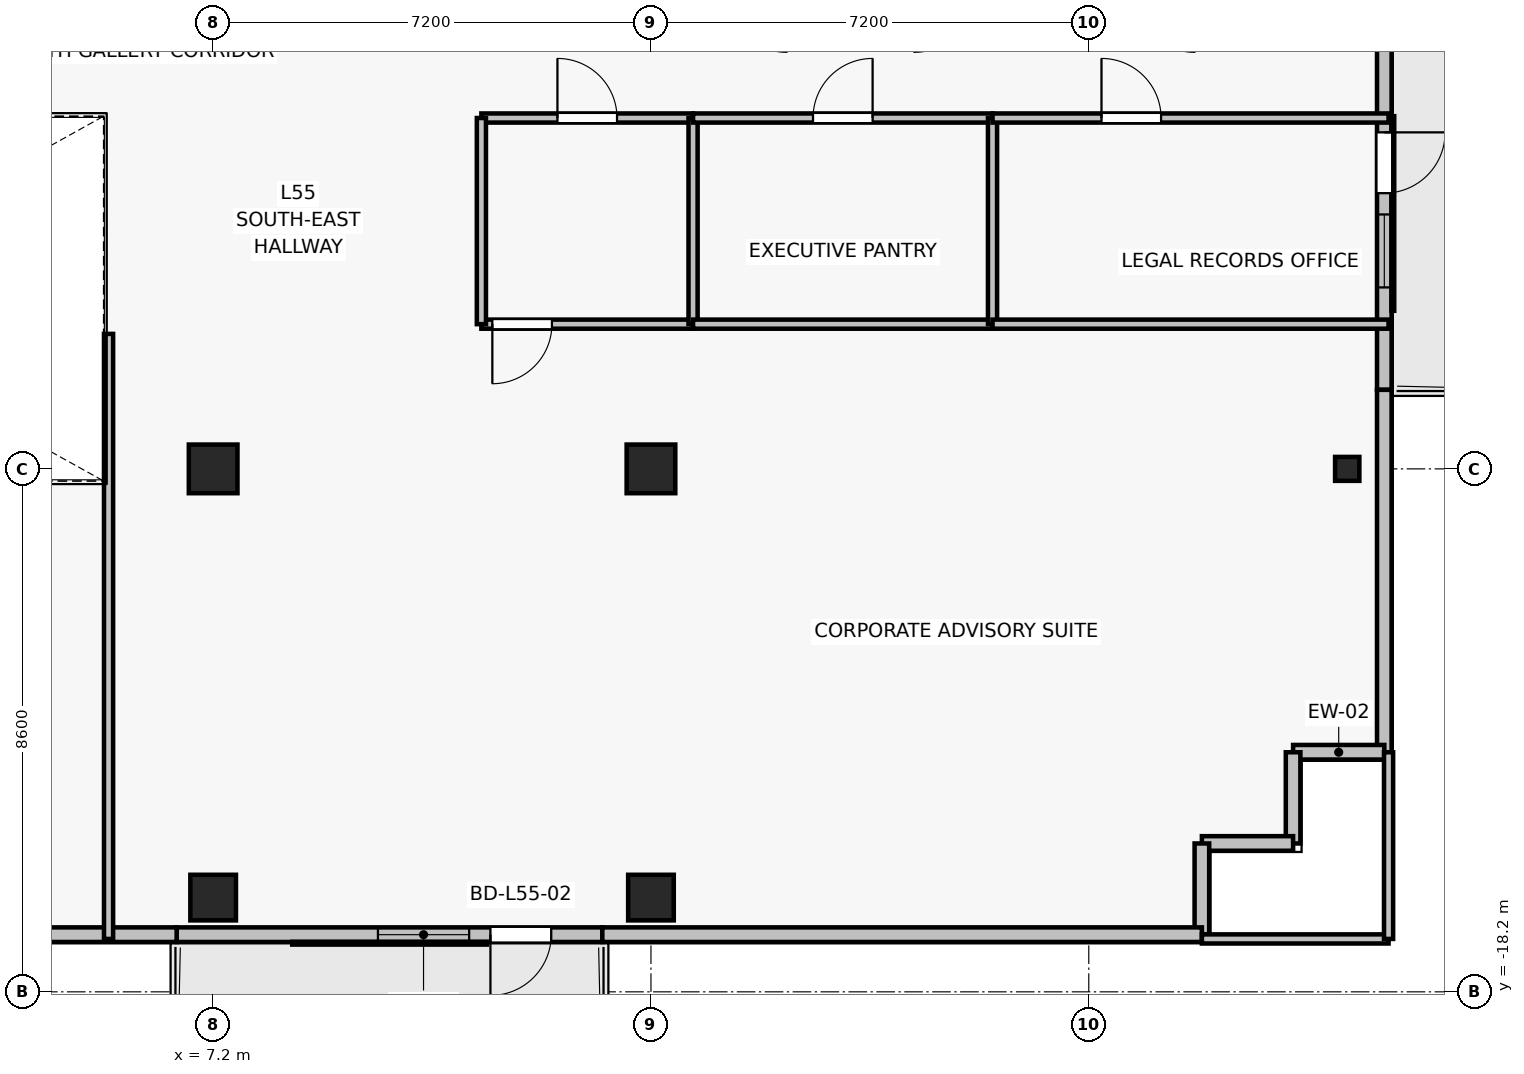
"""IFC4 building model, lengths in metres.
Left out: names, types, materials, properties, quantities, classifications, styles, units other than length and angle.
Written with IfcOpenShell. Run it as: python <this file> out.ifc"""

import sys

from ifc_helpers import new_model, si_unit, direction, frame, frame_2d, origin, origin_2d, place, context, subcontext, project, spatial, rectangle, i_section, extrude, source, transform, mapped, element, fill, save


model = new_model("IFC4")
c1 = context("Model", 3, precision=1e-05, world=origin(), true_north=direction((0.0, 1.0)))
c2 = subcontext(c1, "Body", "Model", "MODEL_VIEW")
j1 = project(units=[si_unit("LENGTHUNIT", "METRE"), si_unit("PLANEANGLEUNIT", "RADIAN")], contexts=[c1])
p1 = place(None, origin())
s1 = spatial("IfcSite", under=j1, at=p1, CompositionType="ELEMENT")
p2 = place(p1, origin())
s2 = spatial("IfcBuilding", under=s1, at=p2, CompositionType="ELEMENT")
p3 = place(p2, frame((0.0, 0.0, 195.7)))
s3 = spatial("IfcBuildingStorey", under=s2, at=p3, CompositionType="ELEMENT", Elevation=195.7)
for number, where, z_axis, x_axis in (
    (1, (7.2, -9.6, 0.0), (0.0, 0.0, 1.0), (1.0, 0.0, 0.0)),
    (2, (14.4, -9.6, 0.0), (0.0, 0.0, 1.0), (1.0, 0.0, 0.0)),
):
    element("IfcColumn", number, at=place(p3, frame(where, z_axis=z_axis, x_axis=x_axis)), inside=s3, PredefinedType="COLUMN", context=c2, shape_type="SweptSolid", body=[
        extrude(rectangle(XDim=0.8, YDim=0.8, at=origin_2d()), origin(), (0.0, 0.0, 1.0), 3.3),
    ])
for number, where, z_axis, x_axis in (
    (3, (7.2, -16.65, 0.0), (0.0, 0.0, 1.0), (1.0, 0.0, 0.0)),
    (4, (14.4, -16.65, 0.0), (0.0, 0.0, 1.0), (1.0, 0.0, 0.0)),
):
    element("IfcColumn", number, at=place(p3, frame(where, z_axis=z_axis, x_axis=x_axis)), inside=s3, PredefinedType="COLUMN", context=c2, shape_type="SweptSolid", body=[
        extrude(rectangle(XDim=0.75, YDim=0.75, at=origin_2d()), origin(), (0.0, 0.0, 1.0), 3.3),
    ])
p4 = place(p3, frame((25.85, -9.6, 0.0), z_axis=(0.0, 0.0, 1.0), x_axis=(1.0, 0.0, 0.0)))
e5 = element("IfcColumn", 5, at=p4, inside=s3, PredefinedType="COLUMN", context=c2, shape_type="SweptSolid", body=[
    extrude(i_section(OverallWidth=0.399, OverallDepth=0.394, WebThickness=0.023, FlangeThickness=0.037, FilletRadius=0.015, at=origin_2d()), origin(), (0.0, 0.0, 1.0), 3.3),
])
p5 = place(p3, frame((13.6, -17.26, 0.0), z_axis=(0.0, 0.0, 1.0), x_axis=(-1.0, 0.0, 0.0)))
e6 = element("IfcWall", 6, at=p5, inside=s3, PredefinedType="SOLIDWALL", context=c2, shape_type="SweptSolid", body=[
    extrude(rectangle(XDim=7.0, YDim=0.24, at=frame_2d((3.5, 0.0))), origin(), (0.0, 0.0, 1.0), 3.05),
])
p6 = place(p5, frame((0.84, 0.0, 0.0)))
e7 = element("IfcOpeningElement", 7, at=p6, cuts=e6, PredefinedType="OPENING", context=c2, shape_type="SweptSolid", body=[
    extrude(rectangle(XDim=1.0, YDim=2.2, at=frame_2d((0.5, 1.1))), frame((0.0, 0.13, 0.0), z_axis=(0.0, -1.0, 0.0), x_axis=(1.0, 0.0, 0.0)), (0.0, 0.0, 1.0), 0.26),
])
p7 = place(p5, frame((2.19, 0.0, 0.85)))
e8 = element("IfcOpeningElement", 8, at=p7, cuts=e6, PredefinedType="OPENING", context=c2, shape_type="SweptSolid", body=[
    extrude(rectangle(XDim=1.5, YDim=1.6, at=frame_2d((0.75, 0.8))), frame((0.0, 0.13, 0.0), z_axis=(0.0, -1.0, 0.0), x_axis=(1.0, 0.0, 0.0)), (0.0, 0.0, 1.0), 0.26),
])
p8 = place(p3, frame((26.46, -2.5, 0.0), z_axis=(0.0, 0.0, 1.0), x_axis=(0.0, -1.0, 0.0)))
e9 = element("IfcWall", 9, at=p8, inside=s3, PredefinedType="SOLIDWALL", context=c2, shape_type="SweptSolid", body=[
    extrude(rectangle(XDim=5.8, YDim=0.24, at=frame_2d((2.9, 0.0))), origin(), (0.0, 0.0, 1.0), 3.05),
])
p9 = place(p8, frame((1.566, 0.0, 0.0)))
e10 = element("IfcOpeningElement", 10, at=p9, cuts=e9, PredefinedType="OPENING", context=c2, shape_type="SweptSolid", body=[
    extrude(rectangle(XDim=1.0, YDim=2.2, at=frame_2d((0.5, 1.1))), frame((0.0, 0.13, 0.0), z_axis=(0.0, -1.0, 0.0), x_axis=(1.0, 0.0, 0.0)), (0.0, 0.0, 1.0), 0.26),
])
p10 = place(p8, frame((2.916, 0.0, 0.85)))
e11 = element("IfcOpeningElement", 11, at=p10, cuts=e9, PredefinedType="OPENING", context=c2, shape_type="SweptSolid", body=[
    extrude(rectangle(XDim=1.2, YDim=1.5, at=frame_2d((0.6, 0.75))), frame((0.0, 0.13, 0.0), z_axis=(0.0, -1.0, 0.0), x_axis=(1.0, 0.0, 0.0)), (0.0, 0.0, 1.0), 0.26),
])
p11 = place(p3, frame((26.46, -14.26, 0.0), z_axis=(0.0, 0.0, 1.0), x_axis=(0.0, 1.0, 0.0)))
e12 = element("IfcWall", 12, at=p11, inside=s3, PredefinedType="SOLIDWALL", context=c2, shape_type="SweptSolid", body=[
    extrude(rectangle(XDim=5.96, YDim=0.24, at=frame_2d((2.98, 0.0))), origin(), (0.0, 0.0, 1.0), 3.05),
])
for number, where, z_axis, x_axis in (
    (13, (24.96, -14.26, 0.0), (0.0, 0.0, 1.0), (1.0, 0.0, 0.0)),
    (14, (24.96, -15.76, 0.0), (0.0, 0.0, 1.0), (0.0, 1.0, 0.0)),
    (15, (23.46, -15.76, 0.0), (0.0, 0.0, 1.0), (1.0, 0.0, 0.0)),
    (16, (23.46, -17.26, 0.0), (0.0, 0.0, 1.0), (0.0, 1.0, 0.0)),
):
    element("IfcWall", number, at=place(p3, frame(where, z_axis=z_axis, x_axis=x_axis)), inside=s3, PredefinedType="SOLIDWALL", context=c2, shape_type="SweptSolid", body=[
        extrude(rectangle(XDim=1.5, YDim=0.24, at=frame_2d((0.75, 0.0))), origin(), (0.0, 0.0, 1.0), 3.05),
    ])
p12 = place(p3, frame((13.6, -17.26, 0.0), z_axis=(0.0, 0.0, 1.0), x_axis=(1.0, 0.0, 0.0)))
e17 = element("IfcWall", 17, at=p12, inside=s3, PredefinedType="SOLIDWALL", context=c2, shape_type="SweptSolid", body=[
    extrude(rectangle(XDim=9.86, YDim=0.24, at=frame_2d((4.93, 0.0))), origin(), (0.0, 0.0, 1.0), 3.05),
])
p13 = place(p3, frame((3.2, -17.26, 0.0), z_axis=(0.0, 0.0, 1.0), x_axis=(1.0, 0.0, 0.0)))
e18 = element("IfcWall", 18, at=p13, inside=s3, PredefinedType="SOLIDWALL", context=c2, shape_type="SweptSolid", body=[
    extrude(rectangle(XDim=3.4, YDim=0.24, at=frame_2d((1.7, 0.0))), origin(), (0.0, 0.0, 1.0), 3.05),
])
p14 = place(p3, frame((15.092, -7.22, 0.0), z_axis=(0.0, 0.0, 1.0), x_axis=(-1.0, 0.0, 0.0)))
e19 = element("IfcWall", 19, at=p14, inside=s3, PredefinedType="PARTITIONING", context=c2, shape_type="SweptSolid", body=[
    extrude(rectangle(XDim=3.481, YDim=0.15, at=frame_2d((1.74, 0.0))), origin(), (0.0, 0.0, 1.0), 2.54),
])
p15 = place(p14, frame((2.321, 0.0, 0.0)))
e20 = element("IfcOpeningElement", 20, at=p15, cuts=e19, PredefinedType="OPENING", context=c2, shape_type="SweptSolid", body=[
    extrude(rectangle(XDim=0.98, YDim=2.15, at=frame_2d((0.49, 1.075))), frame((0.0, 0.085, 0.0), z_axis=(0.0, -1.0, 0.0), x_axis=(1.0, 0.0, 0.0)), (0.0, 0.0, 1.0), 0.17),
])
p16 = place(p3, frame((11.611, -3.83, 0.0), z_axis=(0.0, 0.0, 1.0), x_axis=(1.0, 0.0, 0.0)))
e21 = element("IfcWall", 21, at=p16, inside=s3, PredefinedType="PARTITIONING", context=c2, shape_type="SweptSolid", body=[
    extrude(rectangle(XDim=3.481, YDim=0.15, at=frame_2d((1.74, 0.0))), origin(), (0.0, 0.0, 1.0), 2.54),
])
p17 = place(p16, frame((1.25, 0.0, 0.0)))
e22 = element("IfcOpeningElement", 22, at=p17, cuts=e21, PredefinedType="OPENING", context=c2, shape_type="SweptSolid", body=[
    extrude(rectangle(XDim=0.98, YDim=2.15, at=frame_2d((0.49, 1.075))), frame((0.0, 0.085, 0.0), z_axis=(0.0, -1.0, 0.0), x_axis=(1.0, 0.0, 0.0)), (0.0, 0.0, 1.0), 0.17),
])
for number, where, z_axis, x_axis in (
    (23, (11.611, -7.22, 0.0), (0.0, 0.0, 1.0), (0.0, 1.0, 0.0)),
    (24, (15.092, -3.83, 0.0), (0.0, 0.0, 1.0), (0.0, -1.0, 0.0)),
):
    element("IfcWall", number, at=place(p3, frame(where, z_axis=z_axis, x_axis=x_axis)), inside=s3, PredefinedType="PARTITIONING", context=c2, shape_type="SweptSolid", body=[
        extrude(rectangle(XDim=3.39, YDim=0.15, at=frame_2d((1.695, 0.0))), origin(), (0.0, 0.0, 1.0), 2.64),
    ])
p18 = place(p3, frame((20.017, -7.22, 0.0), z_axis=(0.0, 0.0, 1.0), x_axis=(-1.0, 0.0, 0.0)))
e25 = element("IfcWall", 25, at=p18, inside=s3, PredefinedType="PARTITIONING", context=c2, shape_type="SweptSolid", body=[
    extrude(rectangle(XDim=4.925, YDim=0.15, at=frame_2d((2.462, 0.0))), origin(), (0.0, 0.0, 1.0), 3.05),
])
p19 = place(p3, frame((15.092, -3.83, 0.0), z_axis=(0.0, 0.0, 1.0), x_axis=(1.0, 0.0, 0.0)))
e26 = element("IfcWall", 26, at=p19, inside=s3, PredefinedType="PARTITIONING", context=c2, shape_type="SweptSolid", body=[
    extrude(rectangle(XDim=4.925, YDim=0.15, at=frame_2d((2.462, 0.0))), origin(), (0.0, 0.0, 1.0), 3.05),
])
p20 = place(p19, frame((1.973, 0.0, 0.0)))
e27 = element("IfcOpeningElement", 27, at=p20, cuts=e26, PredefinedType="OPENING", context=c2, shape_type="SweptSolid", body=[
    extrude(rectangle(XDim=0.98, YDim=2.15, at=frame_2d((0.49, 1.075))), frame((0.0, 0.085, 0.0), z_axis=(0.0, -1.0, 0.0), x_axis=(1.0, 0.0, 0.0)), (0.0, 0.0, 1.0), 0.17),
])
p21 = place(p3, frame((20.017, -3.83, 0.0), z_axis=(0.0, 0.0, 1.0), x_axis=(0.0, -1.0, 0.0)))
e28 = element("IfcWall", 28, at=p21, inside=s3, PredefinedType="PARTITIONING", context=c2, shape_type="SweptSolid", body=[
    extrude(rectangle(XDim=3.39, YDim=0.15, at=frame_2d((1.695, 0.0))), origin(), (0.0, 0.0, 1.0), 2.64),
])
p22 = place(p3, frame((26.53, -7.22, 0.0), z_axis=(0.0, 0.0, 1.0), x_axis=(-1.0, 0.0, 0.0)))
e29 = element("IfcWall", 29, at=p22, inside=s3, PredefinedType="PARTITIONING", context=c2, shape_type="SweptSolid", body=[
    extrude(rectangle(XDim=6.513, YDim=0.15, at=frame_2d((3.256, 0.0))), origin(), (0.0, 0.0, 1.0), 2.54),
])
p23 = place(p3, frame((20.017, -3.83, 0.0), z_axis=(0.0, 0.0, 1.0), x_axis=(1.0, 0.0, 0.0)))
e30 = element("IfcWall", 30, at=p23, inside=s3, PredefinedType="PARTITIONING", context=c2, shape_type="SweptSolid", body=[
    extrude(rectangle(XDim=6.513, YDim=0.15, at=frame_2d((3.256, 0.0))), origin(), (0.0, 0.0, 1.0), 2.54),
])
p24 = place(p23, frame((1.792, 0.0, 0.0)))
e31 = element("IfcOpeningElement", 31, at=p24, cuts=e30, PredefinedType="OPENING", context=c2, shape_type="SweptSolid", body=[
    extrude(rectangle(XDim=0.98, YDim=2.15, at=frame_2d((0.49, 1.075))), frame((0.0, 0.085, 0.0), z_axis=(0.0, -1.0, 0.0), x_axis=(1.0, 0.0, 0.0)), (0.0, 0.0, 1.0), 0.17),
])
p25 = place(p3, frame((26.53, -17.33, 0.0), z_axis=(0.0, 0.0, 1.0), x_axis=(-1.0, 0.0, 0.0)))
e32 = element("IfcWall", 32, at=p25, inside=s3, PredefinedType="PARTITIONING", context=c2, shape_type="SweptSolid", body=[
    extrude(rectangle(XDim=3.07, YDim=0.15, at=frame_2d((1.535, 0.0))), origin(), (0.0, 0.0, 1.0), 3.05),
])
p26 = place(p3, frame((5.48, -17.33, 0.0), z_axis=(0.0, 0.0, 1.0), x_axis=(0.0, 1.0, 0.0)))
e33 = element("IfcWall", 33, at=p26, inside=s3, PredefinedType="PARTITIONING", context=c2, shape_type="SweptSolid", body=[
    extrude(rectangle(XDim=9.95, YDim=0.15, at=frame_2d((4.975, 0.0))), origin(), (0.0, 0.0, 1.0), 2.54),
])
p27 = place(p3, frame((26.53, -14.26, 0.0), z_axis=(0.0, 0.0, 1.0), x_axis=(0.0, -1.0, 0.0)))
e34 = element("IfcWall", 34, at=p27, inside=s3, PredefinedType="PARTITIONING", context=c2, shape_type="SweptSolid", body=[
    extrude(rectangle(XDim=3.07, YDim=0.15, at=frame_2d((1.535, 0.0))), origin(), (0.0, 0.0, 1.0), 3.05),
])
m1 = source(origin(), c2, "Body", "SweptSolid", [
    extrude(rectangle(XDim=1.0, YDim=2.2, at=frame_2d((0.5, 1.1))), frame((0.0, 0.025, 0.0), z_axis=(0.0, -1.0, 0.0), x_axis=(1.0, 0.0, 0.0)), (0.0, 0.0, 1.0), 0.05),
])
p28 = place(p6, origin())
e35 = element("IfcDoor", 35, at=p28, inside=s3, OperationType="SINGLE_SWING_RIGHT", PredefinedType="DOOR", context=c2, shape_type="MappedRepresentation", body=[
    mapped(m1, transform((0.0, 0.0, 0.0), x_axis=(1.0, 0.0, 0.0), y_axis=(0.0, 1.0, 0.0), z_axis=(0.0, 0.0, 1.0), scale=1.0)),
])
fill(e7, e35)
m2 = source(origin(), c2, "Body", "SweptSolid", [
    extrude(rectangle(XDim=1.5, YDim=1.6, at=frame_2d((0.75, 0.8))), frame((0.0, 0.03, 0.0), z_axis=(0.0, -1.0, 0.0), x_axis=(1.0, 0.0, 0.0)), (0.0, 0.0, 1.0), 0.06),
])
p29 = place(p7, origin())
e36 = element("IfcWindow", 36, at=p29, inside=s3, PartitioningType="SINGLE_PANEL", PredefinedType="WINDOW", context=c2, shape_type="MappedRepresentation", body=[
    mapped(m2, transform((0.0, 0.0, 0.0), x_axis=(1.0, 0.0, 0.0), y_axis=(0.0, 1.0, 0.0), z_axis=(0.0, 0.0, 1.0), scale=1.0)),
])
fill(e8, e36)
p30 = place(p9, origin())
e37 = element("IfcDoor", 37, at=p30, inside=s3, OperationType="SINGLE_SWING_LEFT", PredefinedType="DOOR", context=c2, shape_type="MappedRepresentation", body=[
    mapped(m1, transform((0.0, 0.0, 0.0), x_axis=(1.0, 0.0, 0.0), y_axis=(0.0, 1.0, 0.0), z_axis=(0.0, 0.0, 1.0), scale=1.0)),
])
fill(e10, e37)
m3 = source(origin(), c2, "Body", "SweptSolid", [
    extrude(rectangle(XDim=1.2, YDim=1.5, at=frame_2d((0.6, 0.75))), frame((0.0, 0.03, 0.0), z_axis=(0.0, -1.0, 0.0), x_axis=(1.0, 0.0, 0.0)), (0.0, 0.0, 1.0), 0.06),
])
p31 = place(p10, origin())
e38 = element("IfcWindow", 38, at=p31, inside=s3, PartitioningType="SINGLE_PANEL", PredefinedType="WINDOW", context=c2, shape_type="MappedRepresentation", body=[
    mapped(m3, transform((0.0, 0.0, 0.0), x_axis=(1.0, 0.0, 0.0), y_axis=(0.0, 1.0, 0.0), z_axis=(0.0, 0.0, 1.0), scale=1.0)),
])
fill(e11, e38)
m4 = source(origin(), c2, "Body", "SweptSolid", [
    extrude(rectangle(XDim=0.98, YDim=2.15, at=frame_2d((0.49, 1.075))), frame((0.0, 0.025, 0.0), z_axis=(0.0, -1.0, 0.0), x_axis=(1.0, 0.0, 0.0)), (0.0, 0.0, 1.0), 0.05),
])
p32 = place(p17, origin())
e39 = element("IfcDoor", 39, at=p32, inside=s3, OperationType="SINGLE_SWING_LEFT", PredefinedType="DOOR", context=c2, shape_type="MappedRepresentation", body=[
    mapped(m4, transform((0.0, 0.0, 0.0), x_axis=(1.0, 0.0, 0.0), y_axis=(0.0, 1.0, 0.0), z_axis=(0.0, 0.0, 1.0), scale=1.0)),
])
fill(e22, e39)
p33 = place(p20, origin())
e40 = element("IfcDoor", 40, at=p33, inside=s3, OperationType="SINGLE_SWING_RIGHT", PredefinedType="DOOR", context=c2, shape_type="MappedRepresentation", body=[
    mapped(m4, transform((0.0, 0.0, 0.0), x_axis=(1.0, 0.0, 0.0), y_axis=(0.0, 1.0, 0.0), z_axis=(0.0, 0.0, 1.0), scale=1.0)),
])
fill(e27, e40)
p34 = place(p24, origin())
e41 = element("IfcDoor", 41, at=p34, inside=s3, OperationType="SINGLE_SWING_LEFT", PredefinedType="DOOR", context=c2, shape_type="MappedRepresentation", body=[
    mapped(m4, transform((0.0, 0.0, 0.0), x_axis=(1.0, 0.0, 0.0), y_axis=(0.0, 1.0, 0.0), z_axis=(0.0, 0.0, 1.0), scale=1.0)),
])
fill(e31, e41)
p35 = place(p15, origin())
e42 = element("IfcDoor", 42, at=p35, inside=s3, OperationType="SINGLE_SWING_RIGHT", PredefinedType="DOOR", context=c2, shape_type="MappedRepresentation", body=[
    mapped(m4, transform((0.0, 0.0, 0.0), x_axis=(1.0, 0.0, 0.0), y_axis=(0.0, 1.0, 0.0), z_axis=(0.0, 0.0, 1.0), scale=1.0)),
])
fill(e20, e42)
save(model, sys.argv[1])
